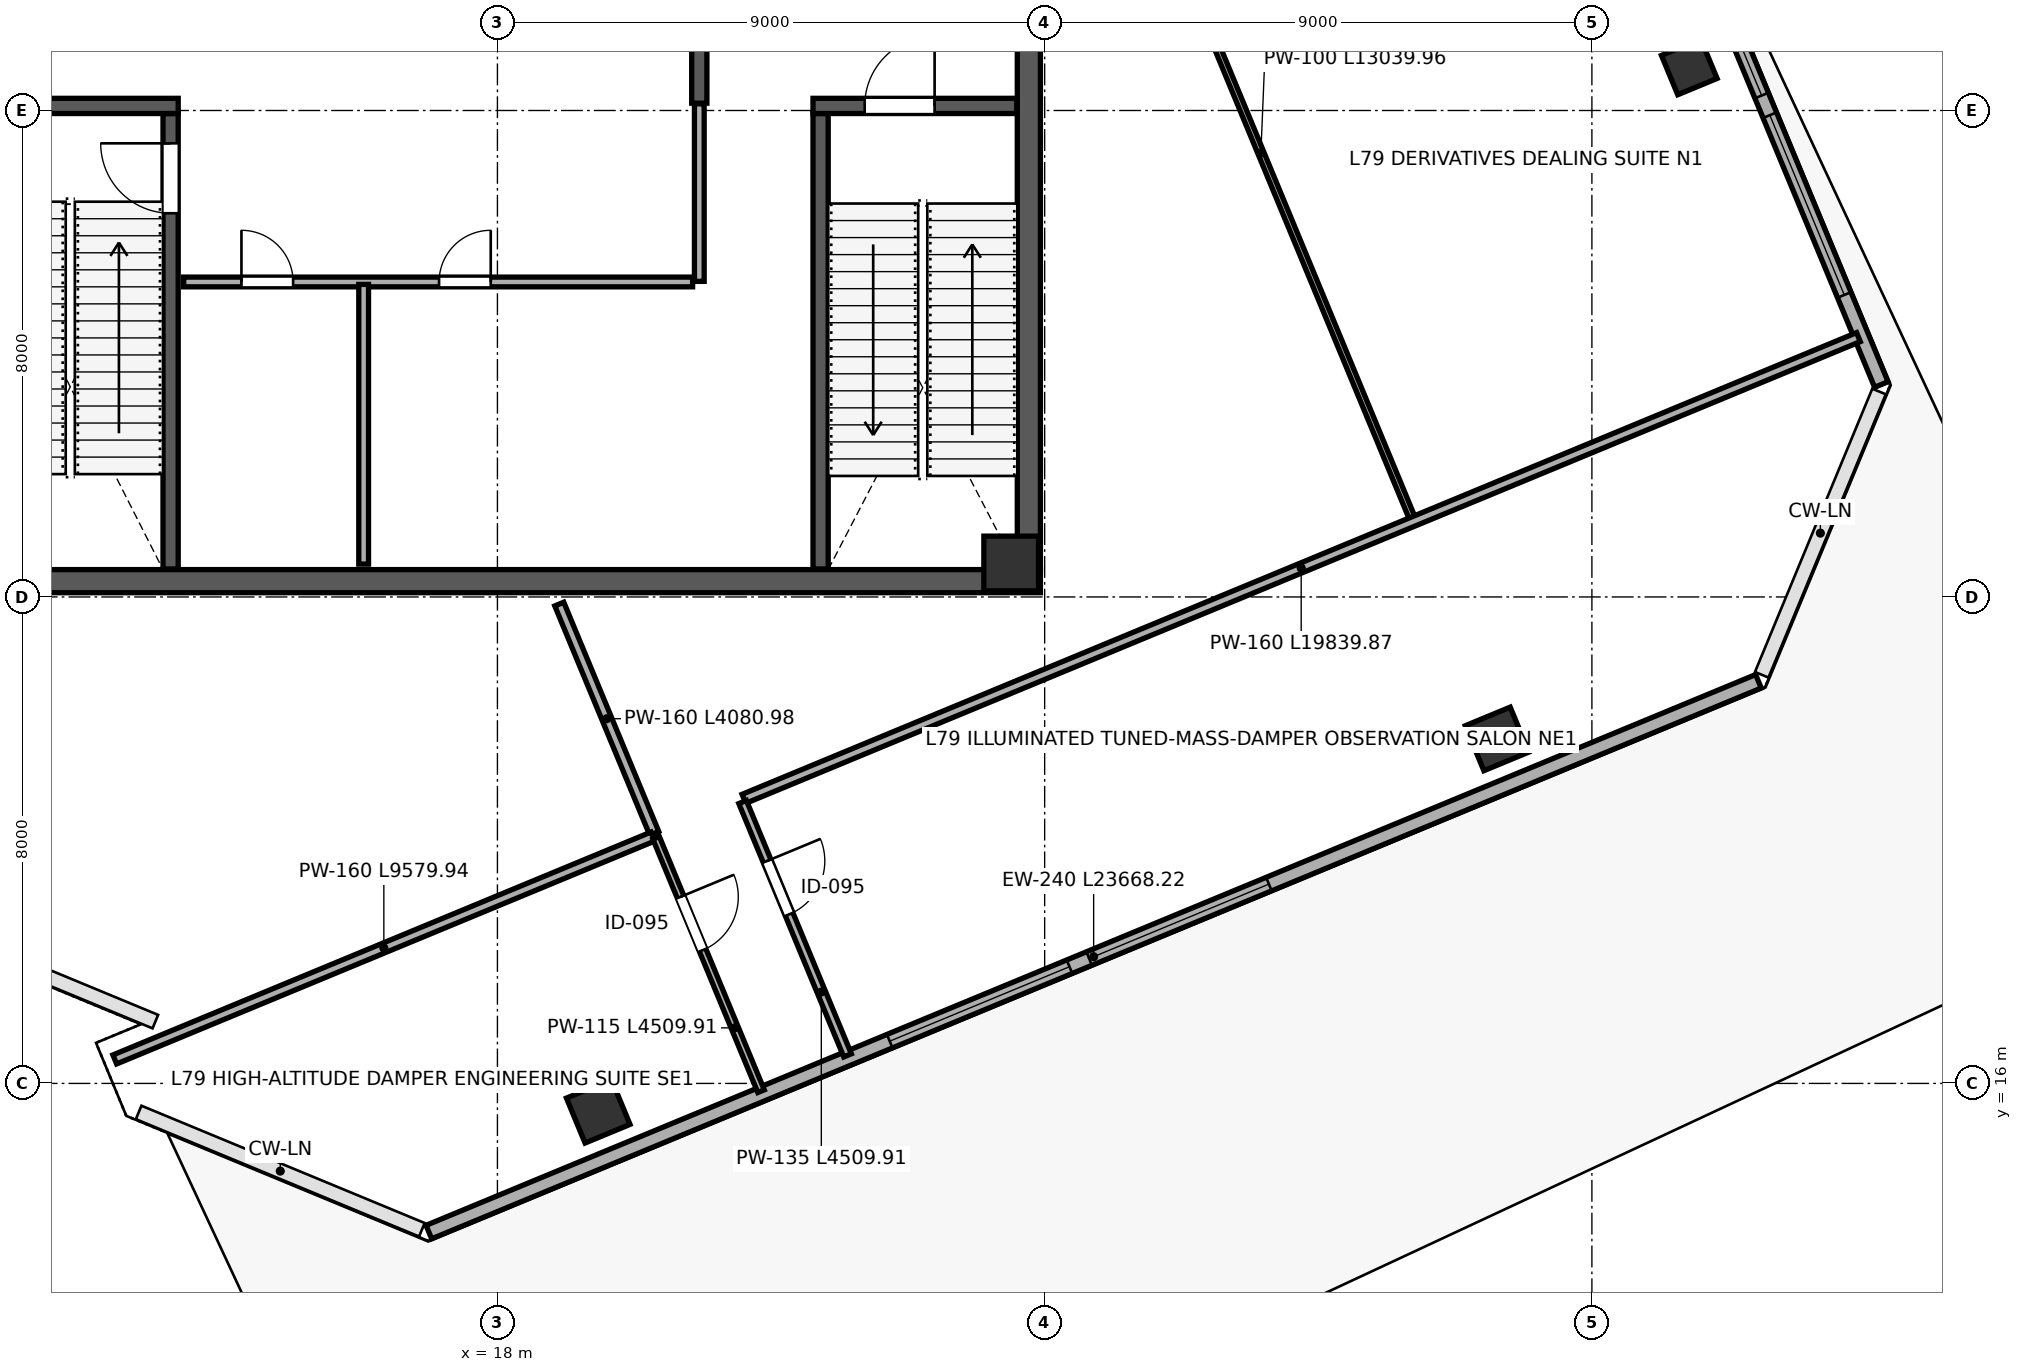
"""IFC4 building model, lengths in metres.
Left out: names, types, materials, properties, quantities, classifications, styles, units other than length and angle.
Written with IfcOpenShell. Run it as: python <this file> out.ifc"""

import sys

from ifc_helpers import new_model, si_unit, direction, frame, frame_2d, origin, origin_2d, place, context, subcontext, project, spatial, rectangle, extrude, source, transform, mapped, element, fill, save


model = new_model("IFC4")
c1 = context("Model", 3, precision=1e-05, world=origin(), true_north=direction((0.0, 1.0)))
c2 = subcontext(c1, "Body", "Model", "MODEL_VIEW")
j1 = project(units=[si_unit("LENGTHUNIT", "METRE"), si_unit("PLANEANGLEUNIT", "RADIAN")], contexts=[c1])
p1 = place(None, origin())
s1 = spatial("IfcSite", under=j1, at=p1, CompositionType="ELEMENT")
p2 = place(p1, origin())
s2 = spatial("IfcBuilding", under=s1, at=p2, CompositionType="ELEMENT")
p3 = place(p2, frame((0.0, 0.0, 349.2)))
s3 = spatial("IfcBuildingStorey", under=s2, at=p3, CompositionType="ELEMENT", Elevation=349.2)
m1 = source(origin(), c2, "Body", "SweptSolid", [
    extrude(rectangle(XDim=0.9, YDim=0.9, at=origin_2d()), origin(), (0.0, 0.0, 1.0), 5.999),
])
p4 = place(p3, frame((26.45, 24.55, 0.001), z_axis=(0.0, 0.0, 1.0), x_axis=(1.0, 0.0, 0.0)))
e1 = element("IfcColumn", 1, at=p4, inside=s3, PredefinedType="COLUMN", context=c2, shape_type="MappedRepresentation", body=[
    mapped(m1, transform((0.0, 0.0, 0.0), scale=1.0)),
])
m2 = source(origin(), c2, "Body", "SweptSolid", [
    extrude(rectangle(XDim=0.7, YDim=0.7, at=origin_2d()), origin(), (0.0, 0.0, 1.0), 5.999),
])
p5 = place(p3, frame((37.602, 32.716, 0.001), z_axis=(0.0, 0.0, 1.0), x_axis=(-0.382683432365, 0.923879532511, 0.0)))
e2 = element("IfcColumn", 2, at=p5, inside=s3, PredefinedType="COLUMN", context=c2, shape_type="MappedRepresentation", body=[
    mapped(m2, transform((0.0, 0.0, 0.0), scale=1.0)),
])
m3 = source(origin(), c2, "Body", "SweptSolid", [
    extrude(rectangle(XDim=0.8, YDim=0.8, at=origin_2d()), origin(), (0.0, 0.0, 1.0), 5.999),
])
for number, where, z_axis, x_axis in (
    (3, (19.658, 15.542, 0.001), (0.0, 0.0, 1.0), (-0.383, 0.924, 0.0)),
    (4, (34.44, 21.665, 0.001), (0.0, 0.0, 1.0), (-0.383, 0.924, 0.0)),
):
    element("IfcColumn", number, at=place(p3, frame(where, z_axis=z_axis, x_axis=x_axis)), inside=s3, PredefinedType="COLUMN", context=c2, shape_type="MappedRepresentation", body=[
        mapped(m3, transform((0.0, 0.0, 0.0), scale=1.0)),
    ])
p6 = place(p3, frame((16.872, 13.555, 0.0), z_axis=(0.0, 0.0, 1.0), x_axis=(0.923879670053, 0.38268310031, 0.0)))
e5 = element("IfcWall", 5, at=p6, inside=s3, PredefinedType="SOLIDWALL", context=c2, shape_type="SweptSolid", body=[
    extrude(rectangle(XDim=23.668, YDim=0.24, at=frame_2d((11.834, 0.0))), origin(), (0.0, 0.0, 1.0), 5.76),
])
p7 = place(p6, frame((8.204, 0.0, 0.45)))
e6 = element("IfcOpeningElement", 6, at=p7, cuts=e5, PredefinedType="OPENING", context=c2, shape_type="SweptSolid", body=[
    extrude(rectangle(XDim=3.2, YDim=2.5, at=frame_2d((1.6, 1.25))), frame((0.0, 0.13, 0.0), z_axis=(0.0, -1.0, 0.0), x_axis=(1.0, 0.0, 0.0)), (0.0, 0.0, 1.0), 0.26),
])
p8 = place(p6, frame((11.754, 0.0, 0.45)))
e7 = element("IfcOpeningElement", 7, at=p8, cuts=e5, PredefinedType="OPENING", context=c2, shape_type="SweptSolid", body=[
    extrude(rectangle(XDim=3.2, YDim=2.5, at=frame_2d((1.6, 1.25))), frame((0.0, 0.13, 0.0), z_axis=(0.0, -1.0, 0.0), x_axis=(1.0, 0.0, 0.0)), (0.0, 0.0, 1.0), 0.26),
])
p9 = place(p3, frame((40.761, 27.494, 0.0), z_axis=(0.0, 0.0, 1.0), x_axis=(-0.382690925775, 0.923876428604, 0.0)))
e8 = element("IfcWall", 8, at=p9, inside=s3, PredefinedType="SOLIDWALL", context=c2, shape_type="SweptSolid", body=[
    extrude(rectangle(XDim=25.368, YDim=0.24, at=frame_2d((12.684, 0.0))), origin(), (0.0, 0.0, 1.0), 5.76),
])
p10 = place(p9, frame((1.594, 0.0, 0.45)))
e9 = element("IfcOpeningElement", 9, at=p10, cuts=e8, PredefinedType="OPENING", context=c2, shape_type="SweptSolid", body=[
    extrude(rectangle(XDim=3.2, YDim=2.5, at=frame_2d((1.6, 1.25))), frame((0.0, 0.13, 0.0), z_axis=(0.0, -1.0, 0.0), x_axis=(1.0, 0.0, 0.0)), (0.0, 0.0, 1.0), 0.26),
])
p11 = place(p9, frame((5.144, 0.0, 0.45)))
e10 = element("IfcOpeningElement", 10, at=p11, cuts=e8, PredefinedType="OPENING", context=c2, shape_type="SweptSolid", body=[
    extrude(rectangle(XDim=3.2, YDim=2.5, at=frame_2d((1.6, 1.25))), frame((0.0, 0.13, 0.0), z_axis=(0.0, -1.0, 0.0), x_axis=(1.0, 0.0, 0.0)), (0.0, 0.0, 1.0), 0.26),
])
p12 = place(p9, frame((8.694, 0.0, 0.45)))
e11 = element("IfcOpeningElement", 11, at=p12, cuts=e8, PredefinedType="OPENING", context=c2, shape_type="SweptSolid", body=[
    extrude(rectangle(XDim=3.2, YDim=2.5, at=frame_2d((1.6, 1.25))), frame((0.0, 0.13, 0.0), z_axis=(0.0, -1.0, 0.0), x_axis=(1.0, 0.0, 0.0)), (0.0, 0.0, 1.0), 0.26),
])
p13 = place(p9, frame((12.244, 0.0, 0.45)))
e12 = element("IfcOpeningElement", 12, at=p13, cuts=e8, PredefinedType="OPENING", context=c2, shape_type="SweptSolid", body=[
    extrude(rectangle(XDim=3.2, YDim=2.5, at=frame_2d((1.6, 1.25))), frame((0.0, 0.13, 0.0), z_axis=(0.0, -1.0, 0.0), x_axis=(1.0, 0.0, 0.0)), (0.0, 0.0, 1.0), 0.26),
])
p14 = place(p9, frame((15.794, 0.0, 0.45)))
e13 = element("IfcOpeningElement", 13, at=p14, cuts=e8, PredefinedType="OPENING", context=c2, shape_type="SweptSolid", body=[
    extrude(rectangle(XDim=3.2, YDim=2.5, at=frame_2d((1.6, 1.25))), frame((0.0, 0.13, 0.0), z_axis=(0.0, -1.0, 0.0), x_axis=(1.0, 0.0, 0.0)), (0.0, 0.0, 1.0), 0.26),
])
p15 = place(p9, frame((19.344, 0.0, 0.45)))
e14 = element("IfcOpeningElement", 14, at=p15, cuts=e8, PredefinedType="OPENING", context=c2, shape_type="SweptSolid", body=[
    extrude(rectangle(XDim=3.2, YDim=2.5, at=frame_2d((1.6, 1.25))), frame((0.0, 0.13, 0.0), z_axis=(0.0, -1.0, 0.0), x_axis=(1.0, 0.0, 0.0)), (0.0, 0.0, 1.0), 0.26),
])
p16 = place(p3, frame((26.74, 24.45, 0.0), z_axis=(0.0, 0.0, 1.0), x_axis=(0.0, 1.0, 0.0)))
e15 = element("IfcWall", 15, at=p16, inside=s3, PredefinedType="SHEAR", context=c2, shape_type="SweptSolid", body=[
    extrude(rectangle(XDim=15.1, YDim=0.38, at=frame_2d((7.55, 0.0))), origin(), (0.0, 0.0, 1.0), 5.76),
])
p17 = place(p16, frame((8.6, 0.0, 0.0)))
e16 = element("IfcOpeningElement", 16, at=p17, cuts=e15, PredefinedType="OPENING", context=c2, shape_type="SweptSolid", body=[
    extrude(rectangle(XDim=1.15, YDim=2.2, at=frame_2d((0.575, 1.1))), frame((0.0, 0.2, 0.0), z_axis=(0.0, -1.0, 0.0), x_axis=(1.0, 0.0, 0.0)), (0.0, 0.0, 1.0), 0.4),
])
p18 = place(p3, frame((9.07, 24.26, 0.0), z_axis=(0.0, 0.0, 1.0), x_axis=(1.0, 0.0, 0.0)))
e17 = element("IfcWall", 17, at=p18, inside=s3, PredefinedType="SHEAR", context=c2, shape_type="SweptSolid", body=[
    extrude(rectangle(XDim=17.86, YDim=0.38, at=frame_2d((8.93, 0.0))), origin(), (0.0, 0.0, 1.0), 5.76),
])
p19 = place(p3, frame((12.625, 24.46, 0.0), z_axis=(0.0, 0.0, 1.0), x_axis=(0.0, 1.0, 0.0)))
e18 = element("IfcWall", 18, at=p19, inside=s3, PredefinedType="SHEAR", context=c2, shape_type="SweptSolid", body=[
    extrude(rectangle(XDim=7.49, YDim=0.25, at=frame_2d((3.745, 0.0))), origin(), (0.0, 0.0, 1.0), 5.76),
])
p20 = place(p19, frame((5.85, 0.0, 0.0)))
e19 = element("IfcOpeningElement", 19, at=p20, cuts=e18, PredefinedType="OPENING", context=c2, shape_type="SweptSolid", body=[
    extrude(rectangle(XDim=1.15, YDim=2.2, at=frame_2d((0.575, 1.1))), frame((0.0, 0.135, 0.0), z_axis=(0.0, -1.0, 0.0), x_axis=(1.0, 0.0, 0.0)), (0.0, 0.0, 1.0), 0.27),
])
p21 = place(p3, frame((9.46, 32.075, 0.0), z_axis=(0.0, 0.0, 1.0), x_axis=(1.0, 0.0, 0.0)))
e20 = element("IfcWall", 20, at=p21, inside=s3, PredefinedType="SHEAR", context=c2, shape_type="SweptSolid", body=[
    extrude(rectangle(XDim=3.29, YDim=0.25, at=frame_2d((1.645, 0.0))), origin(), (0.0, 0.0, 1.0), 5.76),
])
p22 = place(p3, frame((23.315, 24.46, 0.0), z_axis=(0.0, 0.0, 1.0), x_axis=(0.0, 1.0, 0.0)))
e21 = element("IfcWall", 21, at=p22, inside=s3, PredefinedType="SHEAR", context=c2, shape_type="SweptSolid", body=[
    extrude(rectangle(XDim=7.49, YDim=0.25, at=frame_2d((3.745, 0.0))), origin(), (0.0, 0.0, 1.0), 5.76),
])
p23 = place(p3, frame((23.19, 32.075, 0.0), z_axis=(0.0, 0.0, 1.0), x_axis=(1.0, 0.0, 0.0)))
e22 = element("IfcWall", 22, at=p23, inside=s3, PredefinedType="SHEAR", context=c2, shape_type="SweptSolid", body=[
    extrude(rectangle(XDim=3.35, YDim=0.25, at=frame_2d((1.675, 0.0))), origin(), (0.0, 0.0, 1.0), 5.76),
])
p24 = place(p23, frame((0.85, 0.0, 0.0)))
e23 = element("IfcOpeningElement", 23, at=p24, cuts=e22, PredefinedType="OPENING", context=c2, shape_type="SweptSolid", body=[
    extrude(rectangle(XDim=1.15, YDim=2.2, at=frame_2d((0.575, 1.1))), frame((0.0, 0.135, 0.0), z_axis=(0.0, -1.0, 0.0), x_axis=(1.0, 0.0, 0.0)), (0.0, 0.0, 1.0), 0.27),
])
p25 = place(p3, frame((21.32, 32.12, 0.0), z_axis=(0.0, 0.0, 1.0), x_axis=(0.0, 1.0, 0.0)))
e24 = element("IfcWall", 24, at=p25, inside=s3, PredefinedType="SHEAR", context=c2, shape_type="SweptSolid", body=[
    extrude(rectangle(XDim=7.42, YDim=0.25, at=frame_2d((3.71, 0.0))), origin(), (0.0, 0.0, 1.0), 5.76),
])
p26 = place(p25, frame((1.4, 0.0, 0.0)))
e25 = element("IfcOpeningElement", 25, at=p26, cuts=e24, PredefinedType="OPENING", context=c2, shape_type="SweptSolid", body=[
    extrude(rectangle(XDim=1.15, YDim=2.2, at=frame_2d((0.575, 1.1))), frame((0.0, 0.135, 0.0), z_axis=(0.0, -1.0, 0.0), x_axis=(1.0, 0.0, 0.0)), (0.0, 0.0, 1.0), 0.27),
])
p27 = place(p3, frame((12.84, 29.18, 0.0), z_axis=(0.0, 0.0, 1.0), x_axis=(1.0, 0.0, 0.0)))
e26 = element("IfcWall", 26, at=p27, inside=s3, PredefinedType="PARTITIONING", context=c2, shape_type="SweptSolid", body=[
    extrude(rectangle(XDim=8.37, YDim=0.16, at=frame_2d((4.185, 0.0))), origin(), (0.0, 0.0, 1.0), 5.76),
])
p28 = place(p27, frame((0.95, 0.0, 0.0)))
e27 = element("IfcOpeningElement", 27, at=p28, cuts=e26, PredefinedType="OPENING", context=c2, shape_type="SweptSolid", body=[
    extrude(rectangle(XDim=0.85, YDim=2.1, at=frame_2d((0.425, 1.05))), frame((0.0, 0.09, 0.0), z_axis=(0.0, -1.0, 0.0), x_axis=(1.0, 0.0, 0.0)), (0.0, 0.0, 1.0), 0.18),
])
p29 = place(p27, frame((4.2, 0.0, 0.0)))
e28 = element("IfcOpeningElement", 28, at=p29, cuts=e26, PredefinedType="OPENING", context=c2, shape_type="SweptSolid", body=[
    extrude(rectangle(XDim=0.85, YDim=2.1, at=frame_2d((0.425, 1.05))), frame((0.0, 0.09, 0.0), z_axis=(0.0, -1.0, 0.0), x_axis=(1.0, 0.0, 0.0)), (0.0, 0.0, 1.0), 0.18),
])
p30 = place(p3, frame((15.8, 24.54, 0.0), z_axis=(0.0, 0.0, 1.0), x_axis=(0.0, 1.0, 0.0)))
e29 = element("IfcWall", 29, at=p30, inside=s3, PredefinedType="PARTITIONING", context=c2, shape_type="SweptSolid", body=[
    extrude(rectangle(XDim=4.6, YDim=0.16, at=frame_2d((2.3, 0.0))), origin(), (0.0, 0.0, 1.0), 5.76),
])
p31 = place(p3, frame((21.32, 29.19, 0.0), z_axis=(0.0, 0.0, 1.0), x_axis=(0.0, 1.0, 0.0)))
e30 = element("IfcWall", 30, at=p31, inside=s3, PredefinedType="PARTITIONING", context=c2, shape_type="SweptSolid", body=[
    extrude(rectangle(XDim=2.92, YDim=0.16, at=frame_2d((1.46, 0.0))), origin(), (0.0, 0.0, 1.0), 5.76),
])
p32 = place(p3, frame((19.017, 23.883, 0.0), z_axis=(0.0, 0.0, 1.0), x_axis=(0.382749810298, -0.923852035078, 0.0)))
e31 = element("IfcWall", 31, at=p32, inside=s3, PredefinedType="PARTITIONING", context=c2, shape_type="SweptSolid", body=[
    extrude(rectangle(XDim=4.081, YDim=0.16, at=frame_2d((2.041, 0.0))), origin(), (0.0, 0.0, 1.0), 5.76),
])
p33 = place(p3, frame((28.061, 37.326, 0.0), z_axis=(0.0, 0.0, 1.0), x_axis=(0.382702889353, -0.923871472923, 0.0)))
e32 = element("IfcWall", 32, at=p33, inside=s3, PredefinedType="PARTITIONING", context=c2, shape_type="SweptSolid", body=[
    extrude(rectangle(XDim=13.04, YDim=0.1, at=frame_2d((6.52, 0.0))), origin(), (0.0, 0.0, 1.0), 5.76),
])
p34 = place(p3, frame((22.054, 20.68, 0.0), z_axis=(0.0, 0.0, 1.0), x_axis=(0.923880950116, 0.382680009946, 0.0)))
e33 = element("IfcWall", 33, at=p34, inside=s3, PredefinedType="PARTITIONING", context=c2, shape_type="SweptSolid", body=[
    extrude(rectangle(XDim=19.84, YDim=0.16, at=frame_2d((9.92, 0.0))), origin(), (0.0, 0.0, 1.0), 5.76),
])
p35 = place(p3, frame((11.707, 16.394, 0.0), z_axis=(0.0, 0.0, 1.0), x_axis=(0.923883895821, 0.382672898233, 0.0)))
e34 = element("IfcWall", 34, at=p35, inside=s3, PredefinedType="PARTITIONING", context=c2, shape_type="SweptSolid", body=[
    extrude(rectangle(XDim=9.58, YDim=0.16, at=frame_2d((4.79, 0.0))), origin(), (0.0, 0.0, 1.0), 5.76),
])
p36 = place(p3, frame((22.032, 20.628, 0.0), z_axis=(0.0, 0.0, 1.0), x_axis=(0.382684880723, -0.923878932581, 0.0)))
e35 = element("IfcWall", 35, at=p36, inside=s3, PredefinedType="PARTITIONING", context=c2, shape_type="SweptSolid", body=[
    extrude(rectangle(XDim=4.51, YDim=0.135, at=frame_2d((2.255, 0.0))), origin(), (0.0, 0.0, 1.0), 5.76),
])
p37 = place(p36, frame((1.05, 0.0, 0.0)))
e36 = element("IfcOpeningElement", 36, at=p37, cuts=e35, PredefinedType="OPENING", context=c2, shape_type="SweptSolid", body=[
    extrude(rectangle(XDim=0.95, YDim=2.15, at=frame_2d((0.475, 1.075))), frame((0.0, 0.078, 0.0), z_axis=(0.0, -1.0, 0.0), x_axis=(1.0, 0.0, 0.0)), (0.0, 0.0, 1.0), 0.155),
])
p38 = place(p3, frame((20.61, 20.039, 0.0), z_axis=(0.0, 0.0, 1.0), x_axis=(0.382665741697, -0.923886860028, 0.0)))
e37 = element("IfcWall", 37, at=p38, inside=s3, PredefinedType="PARTITIONING", context=c2, shape_type="SweptSolid", body=[
    extrude(rectangle(XDim=4.51, YDim=0.115, at=frame_2d((2.255, 0.0))), origin(), (0.0, 0.0, 1.0), 5.76),
])
p39 = place(p38, frame((1.05, 0.0, 0.0)))
e38 = element("IfcOpeningElement", 38, at=p39, cuts=e37, PredefinedType="OPENING", context=c2, shape_type="SweptSolid", body=[
    extrude(rectangle(XDim=0.95, YDim=2.15, at=frame_2d((0.475, 1.075))), frame((0.0, 0.067, 0.0), z_axis=(0.0, -1.0, 0.0), x_axis=(1.0, 0.0, 0.0)), (0.0, 0.0, 1.0), 0.135),
])
m4 = source(origin(), c2, "Body", "SweptSolid", [
    extrude(rectangle(XDim=3.2, YDim=2.5, at=frame_2d((1.6, 1.25))), frame((0.0, 0.03, 0.0), z_axis=(0.0, -1.0, 0.0), x_axis=(1.0, 0.0, 0.0)), (0.0, 0.0, 1.0), 0.06),
])
p40 = place(p7, origin())
e39 = element("IfcWindow", 39, at=p40, inside=s3, PartitioningType="TRIPLE_PANEL_VERTICAL", PredefinedType="WINDOW", context=c2, shape_type="MappedRepresentation", body=[
    mapped(m4, transform((0.0, 0.0, 0.0), scale=1.0)),
])
fill(e6, e39)
p41 = place(p8, origin())
e40 = element("IfcWindow", 40, at=p41, inside=s3, PartitioningType="TRIPLE_PANEL_VERTICAL", PredefinedType="WINDOW", context=c2, shape_type="MappedRepresentation", body=[
    mapped(m4, transform((0.0, 0.0, 0.0), scale=1.0)),
])
fill(e7, e40)
p42 = place(p10, origin())
e41 = element("IfcWindow", 41, at=p42, inside=s3, PartitioningType="TRIPLE_PANEL_VERTICAL", PredefinedType="WINDOW", context=c2, shape_type="MappedRepresentation", body=[
    mapped(m4, transform((0.0, 0.0, 0.0), scale=1.0)),
])
fill(e9, e41)
p43 = place(p11, origin())
e42 = element("IfcWindow", 42, at=p43, inside=s3, PartitioningType="TRIPLE_PANEL_VERTICAL", PredefinedType="WINDOW", context=c2, shape_type="MappedRepresentation", body=[
    mapped(m4, transform((0.0, 0.0, 0.0), scale=1.0)),
])
fill(e10, e42)
m5 = source(origin(), c2, "Body", "SweptSolid", [
    extrude(rectangle(XDim=1.15, YDim=2.2, at=frame_2d((0.575, 1.1))), frame((0.0, 0.025, 0.0), z_axis=(0.0, -1.0, 0.0), x_axis=(1.0, 0.0, 0.0)), (0.0, 0.0, 1.0), 0.05),
])
p44 = place(p20, origin())
e43 = element("IfcDoor", 43, at=p44, inside=s3, OperationType="SINGLE_SWING_RIGHT", PredefinedType="DOOR", context=c2, shape_type="MappedRepresentation", body=[
    mapped(m5, transform((0.0, 0.0, 0.0), scale=1.0)),
])
fill(e19, e43)
p45 = place(p24, origin())
e44 = element("IfcDoor", 44, at=p45, inside=s3, OperationType="SINGLE_SWING_RIGHT", PredefinedType="DOOR", context=c2, shape_type="MappedRepresentation", body=[
    mapped(m5, transform((0.0, 0.0, 0.0), scale=1.0)),
])
fill(e23, e44)
m6 = source(origin(), c2, "Body", "SweptSolid", [
    extrude(rectangle(XDim=0.85, YDim=2.1, at=frame_2d((0.425, 1.05))), frame((0.0, 0.025, 0.0), z_axis=(0.0, -1.0, 0.0), x_axis=(1.0, 0.0, 0.0)), (0.0, 0.0, 1.0), 0.05),
])
p46 = place(p28, origin())
e45 = element("IfcDoor", 45, at=p46, inside=s3, OperationType="SINGLE_SWING_LEFT", PredefinedType="DOOR", context=c2, shape_type="MappedRepresentation", body=[
    mapped(m6, transform((0.0, 0.0, 0.0), scale=1.0)),
])
fill(e27, e45)
p47 = place(p29, origin())
e46 = element("IfcDoor", 46, at=p47, inside=s3, OperationType="SINGLE_SWING_RIGHT", PredefinedType="DOOR", context=c2, shape_type="MappedRepresentation", body=[
    mapped(m6, transform((0.0, 0.0, 0.0), scale=1.0)),
])
fill(e28, e46)
m7 = source(origin(), c2, "Body", "SweptSolid", [
    extrude(rectangle(XDim=0.95, YDim=2.15, at=frame_2d((0.475, 1.075))), frame((0.0, 0.025, 0.0), z_axis=(0.0, -1.0, 0.0), x_axis=(1.0, 0.0, 0.0)), (0.0, 0.0, 1.0), 0.05),
])
p48 = place(p37, origin())
e47 = element("IfcDoor", 47, at=p48, inside=s3, OperationType="SINGLE_SWING_LEFT", PredefinedType="DOOR", context=c2, shape_type="MappedRepresentation", body=[
    mapped(m7, transform((0.0, 0.0, 0.0), scale=1.0)),
])
fill(e36, e47)
p49 = place(p39, origin())
e48 = element("IfcDoor", 48, at=p49, inside=s3, OperationType="SINGLE_SWING_LEFT", PredefinedType="DOOR", context=c2, shape_type="MappedRepresentation", body=[
    mapped(m7, transform((0.0, 0.0, 0.0), scale=1.0)),
])
fill(e38, e48)
save(model, sys.argv[1])
